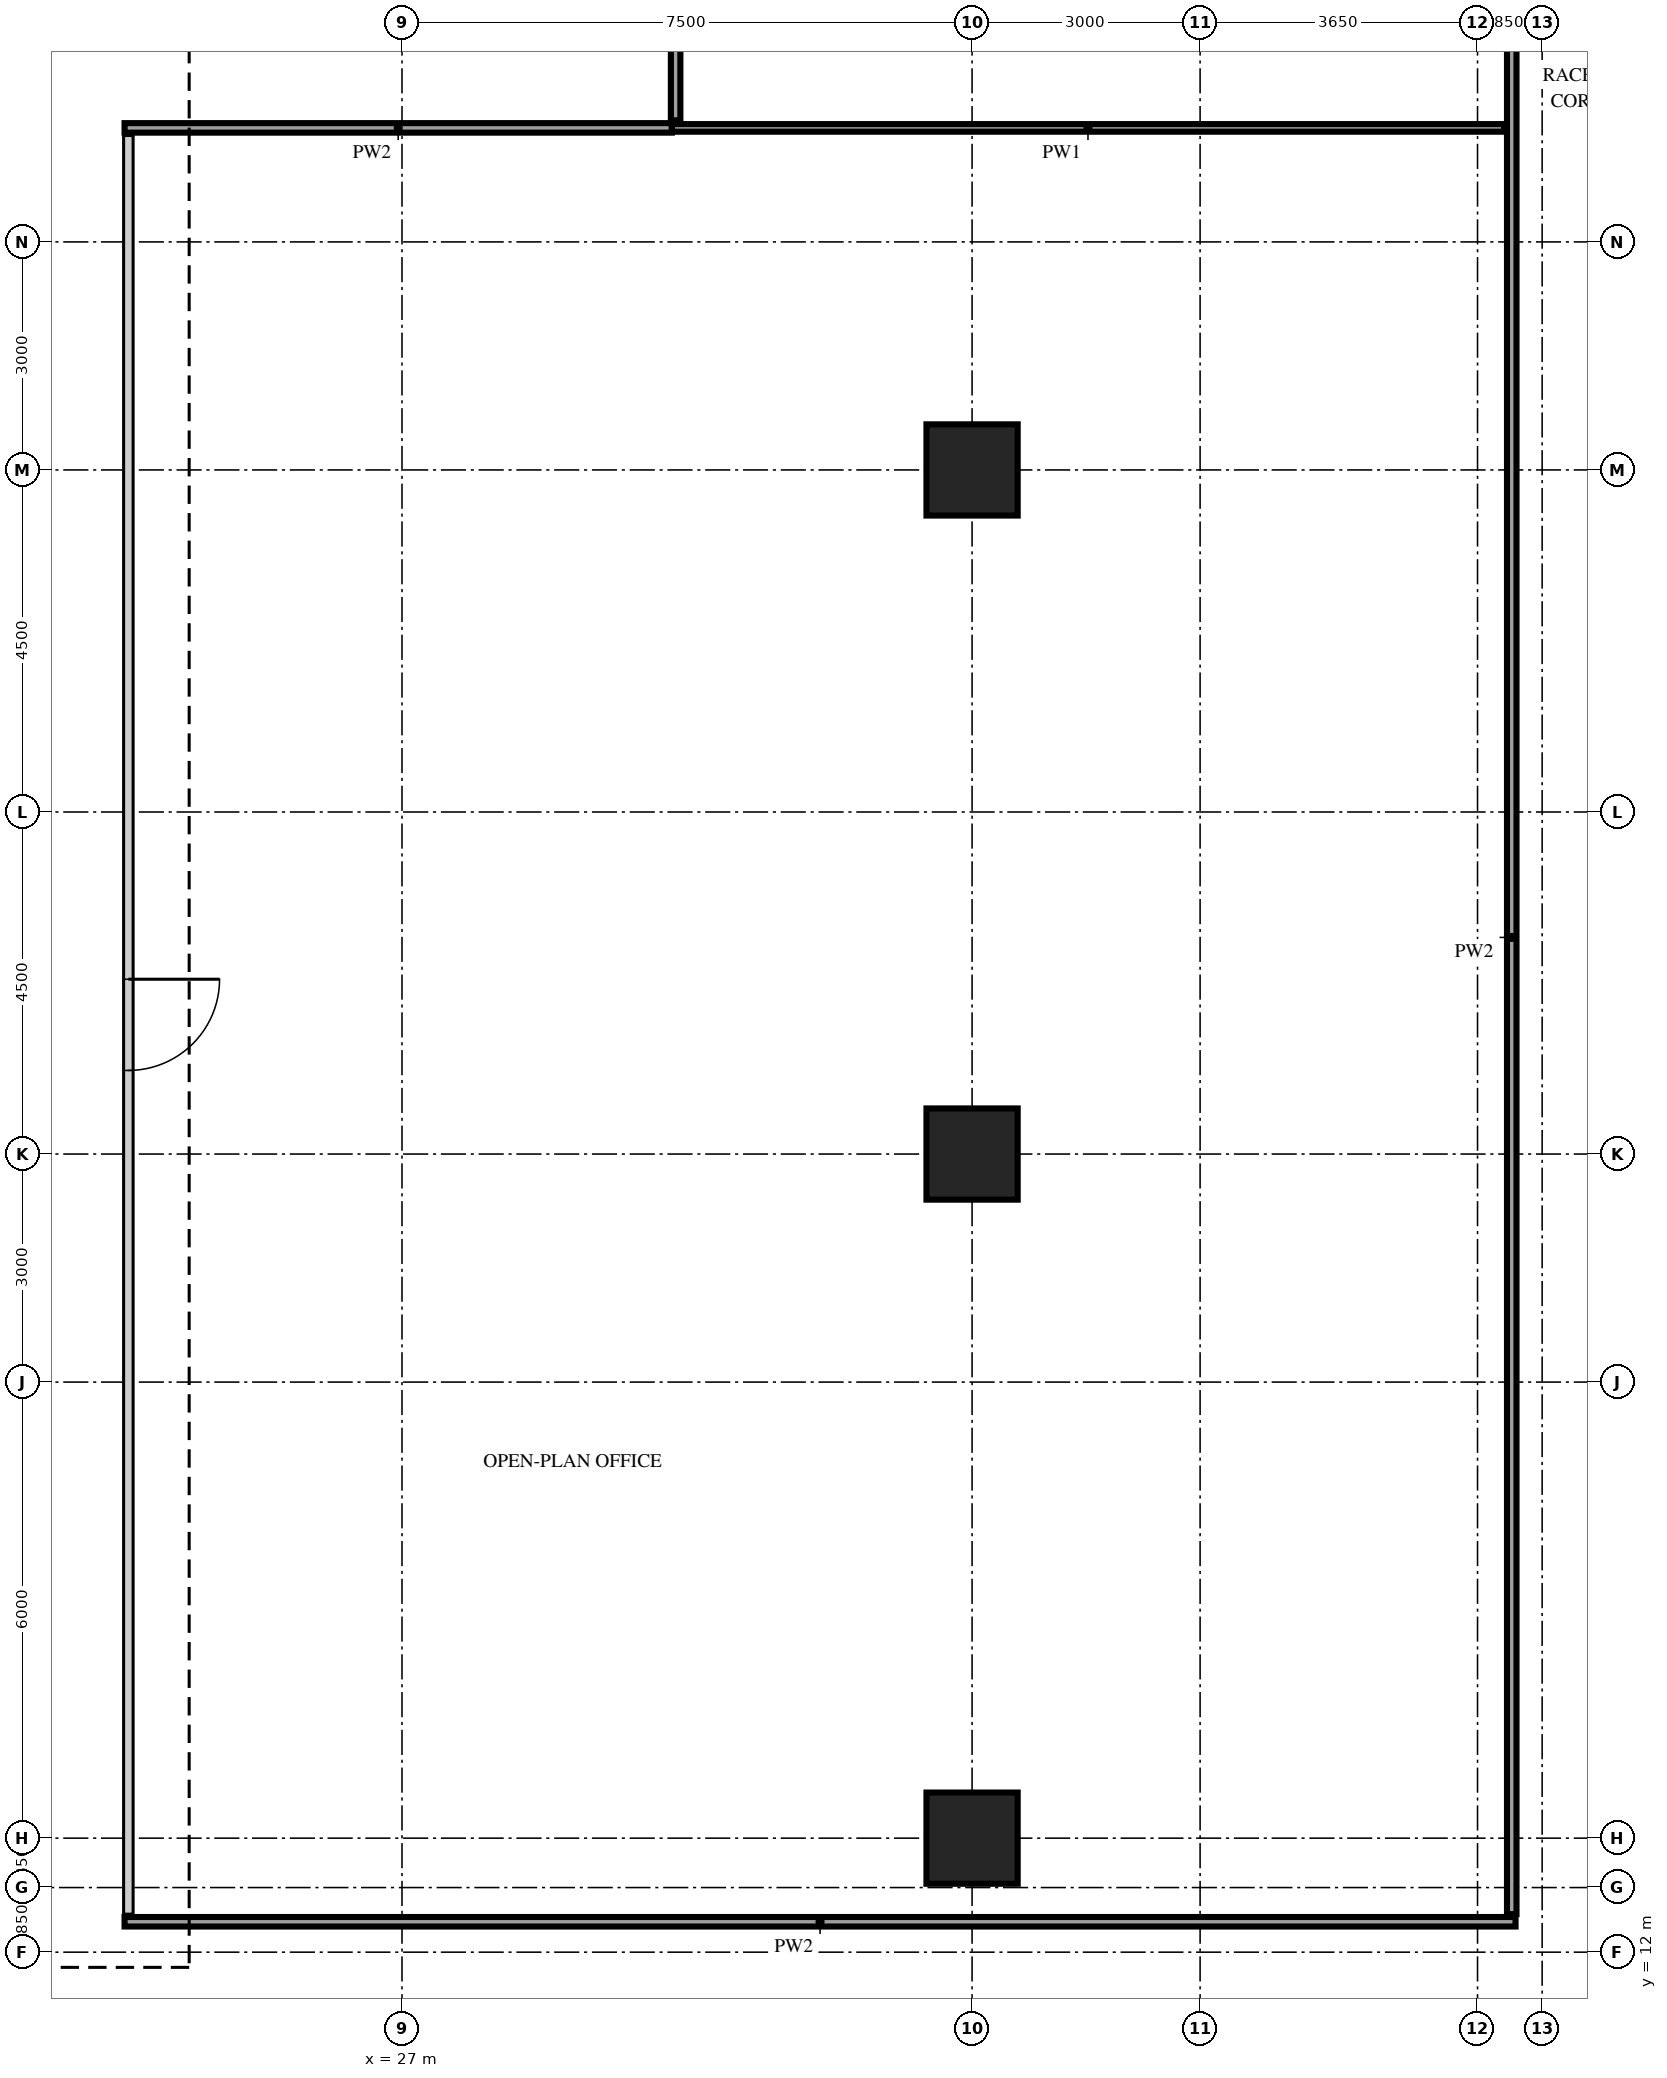
"""IFC4 building model, lengths in metres.
Left out: names, types, materials, properties, quantities, classifications, styles, units other than length and angle.
Written with IfcOpenShell. Run it as: python <this file> out.ifc"""

import sys

from ifc_helpers import new_model, si_unit, direction, frame, frame_2d, origin, origin_2d, place, context, subcontext, project, spatial, rectangle, extrude, source, transform, mapped, element, fill, save


model = new_model("IFC4")
c1 = context("Model", 3, precision=1e-05, world=origin(), true_north=direction((0.0, 1.0)))
c2 = subcontext(c1, "Body", "Model", "MODEL_VIEW")
j1 = project(units=[si_unit("LENGTHUNIT", "METRE"), si_unit("PLANEANGLEUNIT", "RADIAN")], contexts=[c1])
p1 = place(None, origin())
s1 = spatial("IfcSite", under=j1, at=p1, CompositionType="ELEMENT")
p2 = place(p1, origin())
s2 = spatial("IfcBuilding", under=s1, at=p2, CompositionType="ELEMENT")
p3 = place(p2, frame((0.0, 0.0, 204.7)))
s3 = spatial("IfcBuildingStorey", under=s2, at=p3, CompositionType="ELEMENT", Elevation=204.7)
m1 = source(origin(), c2, "Body", "SweptSolid", [
    extrude(rectangle(XDim=1.2, YDim=1.2, at=origin_2d()), origin(), (0.0, 0.0, 1.0), 3.75),
])
for number, where, z_axis, x_axis in (
    (1, (34.5, 13.5, 0.0), (0.0, 0.0, 1.0), (1.0, 0.0, 0.0)),
    (2, (34.5, 22.5, 0.0), (0.0, 0.0, 1.0), (1.0, 0.0, 0.0)),
    (3, (34.5, 31.5, 0.0), (0.0, 0.0, 1.0), (1.0, 0.0, 0.0)),
):
    element("IfcColumn", number, at=place(p3, frame(where, z_axis=z_axis, x_axis=x_axis)), inside=s3, PredefinedType="COLUMN", context=c2, shape_type="MappedRepresentation", body=[
        mapped(m1, transform((0.0, 0.0, 0.0))),
    ])
m2 = source(origin(), c2, "Body", "SweptSolid", [
    extrude(rectangle(XDim=18.3, YDim=0.125, at=frame_2d((9.15, 0.0))), origin(), (0.0, 0.0, 1.0), 3.8),
])
p4 = place(p3, frame((23.35, 12.4, 0.0), z_axis=(0.0, 0.0, 1.0), x_axis=(1.0, 0.0, 0.0)))
e4 = element("IfcWall", 4, at=p4, inside=s3, PredefinedType="PARTITIONING", context=c2, shape_type="MappedRepresentation", body=[
    mapped(m2, transform((0.0, 0.0, 0.0))),
])
m3 = source(origin(), c2, "Body", "SweptSolid", [
    extrude(rectangle(XDim=23.4, YDim=0.125, at=frame_2d((11.7, 0.0))), origin(), (0.0, 0.0, 1.0), 3.8),
])
p5 = place(p3, frame((23.4, 12.5, 0.0), z_axis=(0.0, 0.0, 1.0), x_axis=(0.0, 1.0, 0.0)))
e5 = element("IfcWall", 5, at=p5, inside=s3, PredefinedType="PARTITIONING", context=c2, shape_type="MappedRepresentation", body=[
    mapped(m3, transform((0.0, 0.0, 0.0))),
])
m4 = source(origin(), c2, "Body", "SweptSolid", [
    extrude(rectangle(XDim=1.2, YDim=2.1, at=frame_2d((0.6, 1.05))), frame((0.0, 0.073, 0.0), z_axis=(0.0, -1.0, 0.0), x_axis=(1.0, 0.0, 0.0)), (0.0, 0.0, 1.0), 0.145),
])
p6 = place(p5, frame((11.1, 0.0, 0.0)))
e6 = element("IfcOpeningElement", 6, at=p6, cuts=e5, PredefinedType="OPENING", context=c2, shape_type="MappedRepresentation", body=[
    mapped(m4, transform((0.0, 0.0, 0.0))),
])
m5 = source(origin(), c2, "Body", "SweptSolid", [
    extrude(rectangle(XDim=29.0, YDim=0.125, at=frame_2d((14.5, 0.0))), origin(), (0.0, 0.0, 1.0), 3.8),
])
p7 = place(p3, frame((41.6, 12.5, 0.0), z_axis=(0.0, 0.0, 1.0), x_axis=(0.0, 1.0, 0.0)))
e7 = element("IfcWall", 7, at=p7, inside=s3, PredefinedType="PARTITIONING", context=c2, shape_type="MappedRepresentation", body=[
    mapped(m5, transform((0.0, 0.0, 0.0))),
])
m6 = source(origin(), c2, "Body", "SweptSolid", [
    extrude(rectangle(XDim=0.9, YDim=2.1, at=frame_2d((0.45, 1.05))), frame((0.0, 0.073, 0.0), z_axis=(0.0, -1.0, 0.0), x_axis=(1.0, 0.0, 0.0)), (0.0, 0.0, 1.0), 0.145),
])
p8 = place(p7, frame((25.7, 0.0, 0.0)))
e8 = element("IfcOpeningElement", 8, at=p8, cuts=e7, PredefinedType="OPENING", context=c2, shape_type="MappedRepresentation", body=[
    mapped(m6, transform((0.0, 0.0, 0.0))),
])
m7 = source(origin(), c2, "Body", "SweptSolid", [
    extrude(rectangle(XDim=7.2, YDim=0.125, at=frame_2d((3.6, 0.0))), origin(), (0.0, 0.0, 1.0), 3.8),
])
p9 = place(p3, frame((23.35, 36.0, 0.0), z_axis=(0.0, 0.0, 1.0), x_axis=(1.0, 0.0, 0.0)))
e9 = element("IfcWall", 9, at=p9, inside=s3, PredefinedType="PARTITIONING", context=c2, shape_type="MappedRepresentation", body=[
    mapped(m7, transform((0.0, 0.0, 0.0))),
])
m8 = source(origin(), c2, "Body", "SweptSolid", [
    extrude(rectangle(XDim=10.95, YDim=0.1, at=frame_2d((5.475, 0.0))), origin(), (0.0, 0.0, 1.0), 3.8),
])
p10 = place(p3, frame((30.55, 36.0, 0.0), z_axis=(0.0, 0.0, 1.0), x_axis=(1.0, 0.0, 0.0)))
e10 = element("IfcWall", 10, at=p10, inside=s3, PredefinedType="PARTITIONING", context=c2, shape_type="MappedRepresentation", body=[
    mapped(m8, transform((0.0, 0.0, 0.0))),
])
m9 = source(origin(), c2, "Body", "SweptSolid", [
    extrude(rectangle(XDim=5.4, YDim=0.125, at=frame_2d((2.7, 0.0))), origin(), (0.0, 0.0, 1.0), 3.8),
])
p11 = place(p3, frame((30.6, 36.1, 0.0), z_axis=(0.0, 0.0, 1.0), x_axis=(0.0, 1.0, 0.0)))
e11 = element("IfcWall", 11, at=p11, inside=s3, PredefinedType="PARTITIONING", context=c2, shape_type="MappedRepresentation", body=[
    mapped(m9, transform((0.0, 0.0, 0.0))),
])
m10 = source(origin(), c2, "Body", "SweptSolid", [
    extrude(rectangle(XDim=1.2, YDim=2.1, at=frame_2d((0.6, 1.05))), frame((0.0, 0.025, 0.0), z_axis=(0.0, -1.0, 0.0), x_axis=(1.0, 0.0, 0.0)), (0.0, 0.0, 1.0), 0.05),
])
p12 = place(p6, origin())
e12 = element("IfcDoor", 12, at=p12, inside=s3, OperationType="SINGLE_SWING_RIGHT", PredefinedType="DOOR", context=c2, shape_type="MappedRepresentation", body=[
    mapped(m10, transform((0.0, 0.0, 0.0))),
])
fill(e6, e12)
save(model, sys.argv[1])
